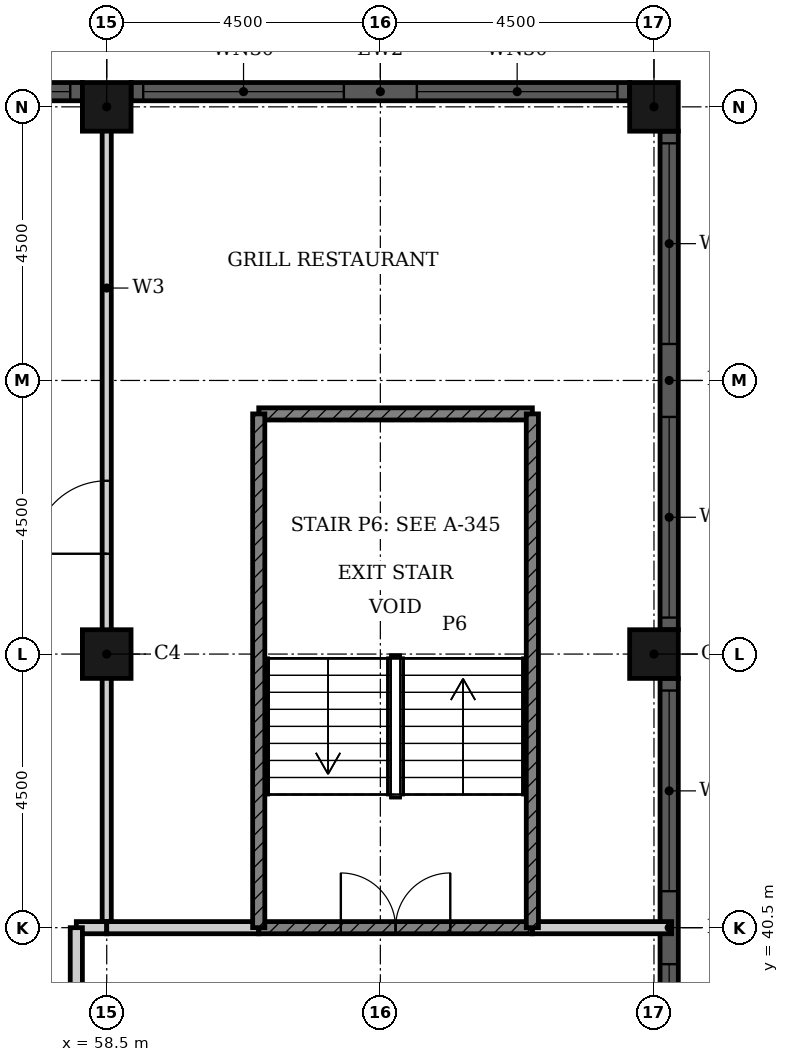
"""IFC4 building model, lengths in metres.
Left out: names, types, materials, properties, quantities, classifications, styles, units other than length and angle.
Written with IfcOpenShell. Run it as: python <this file> out.ifc"""

import sys

from ifc_helpers import new_model, si_unit, direction, frame, frame_2d, origin, origin_2d, place, context, subcontext, project, spatial, rectangle, hollow_rectangle, extrude, element, fill, save


model = new_model("IFC4")
c1 = context("Model", 3, precision=1e-05, world=origin(), true_north=direction((0.0, 1.0)))
c2 = subcontext(c1, "Body", "Model", "MODEL_VIEW")
j1 = project(units=[si_unit("LENGTHUNIT", "METRE"), si_unit("PLANEANGLEUNIT", "RADIAN")], contexts=[c1])
p1 = place(None, origin())
s1 = spatial("IfcSite", under=j1, at=p1, CompositionType="ELEMENT")
p2 = place(p1, origin())
s2 = spatial("IfcBuilding", under=s1, at=p2, CompositionType="ELEMENT")
p3 = place(p2, frame((0.0, 0.0, 12.0)))
s3 = spatial("IfcBuildingStorey", under=s2, at=p3, CompositionType="ELEMENT", Elevation=12.0)
for number, where, z_axis, x_axis in (
    (1, (58.5, 54.0, 0.0), (0.0, 0.0, 1.0), (1.0, 0.0, 0.0)),
    (2, (67.5, 45.0, 0.0), (0.0, 0.0, 1.0), (1.0, 0.0, 0.0)),
    (3, (67.5, 54.0, 0.0), (0.0, 0.0, 1.0), (1.0, 0.0, 0.0)),
    (4, (58.5, 45.0, 0.0), (0.0, 0.0, 1.0), (1.0, 0.0, 0.0)),
):
    element("IfcColumn", number, at=place(p3, frame(where, z_axis=z_axis, x_axis=x_axis)), inside=s3, PredefinedType="COLUMN", context=c2, shape_type="SweptSolid", body=[
        extrude(hollow_rectangle(XDim=0.8, YDim=0.8, WallThickness=0.025, at=origin_2d()), origin(), (0.0, 0.0, 1.0), 5.4),
    ])
p4 = place(p3, frame((67.75, 36.4, 0.0), z_axis=(0.0, 0.0, 1.0), x_axis=(0.0, 1.0, 0.0)))
e5 = element("IfcWall", 5, at=p4, inside=s3, PredefinedType="SOLIDWALL", context=c2, shape_type="SweptSolid", body=[
    extrude(rectangle(XDim=8.2, YDim=0.3, at=frame_2d((4.1, 0.0))), origin(), (0.0, 0.0, 1.0), 5.4),
])
p5 = place(p4, frame((0.2, 0.0, 0.9)))
e6 = element("IfcOpeningElement", 6, at=p5, cuts=e5, PredefinedType="OPENING", context=c2, shape_type="SweptSolid", body=[
    extrude(rectangle(XDim=3.3, YDim=3.5, at=frame_2d((1.65, 1.75))), frame((0.0, 0.16, 0.0), z_axis=(0.0, -1.0, 0.0), x_axis=(1.0, 0.0, 0.0)), (0.0, 0.0, 1.0), 0.32),
])
p6 = place(p4, frame((4.7, 0.0, 0.9)))
e7 = element("IfcOpeningElement", 7, at=p6, cuts=e5, PredefinedType="OPENING", context=c2, shape_type="SweptSolid", body=[
    extrude(rectangle(XDim=3.3, YDim=3.5, at=frame_2d((1.65, 1.75))), frame((0.0, 0.16, 0.0), z_axis=(0.0, -1.0, 0.0), x_axis=(1.0, 0.0, 0.0)), (0.0, 0.0, 1.0), 0.32),
])
p7 = place(p3, frame((67.75, 45.4, 0.0), z_axis=(0.0, 0.0, 1.0), x_axis=(0.0, 1.0, 0.0)))
e8 = element("IfcWall", 8, at=p7, inside=s3, PredefinedType="SOLIDWALL", context=c2, shape_type="SweptSolid", body=[
    extrude(rectangle(XDim=8.2, YDim=0.3, at=frame_2d((4.1, 0.0))), origin(), (0.0, 0.0, 1.0), 5.4),
])
p8 = place(p7, frame((0.2, 0.0, 0.9)))
e9 = element("IfcOpeningElement", 9, at=p8, cuts=e8, PredefinedType="OPENING", context=c2, shape_type="SweptSolid", body=[
    extrude(rectangle(XDim=3.3, YDim=3.5, at=frame_2d((1.65, 1.75))), frame((0.0, 0.16, 0.0), z_axis=(0.0, -1.0, 0.0), x_axis=(1.0, 0.0, 0.0)), (0.0, 0.0, 1.0), 0.32),
])
p9 = place(p7, frame((4.7, 0.0, 0.9)))
e10 = element("IfcOpeningElement", 10, at=p9, cuts=e8, PredefinedType="OPENING", context=c2, shape_type="SweptSolid", body=[
    extrude(rectangle(XDim=3.3, YDim=3.5, at=frame_2d((1.65, 1.75))), frame((0.0, 0.16, 0.0), z_axis=(0.0, -1.0, 0.0), x_axis=(1.0, 0.0, 0.0)), (0.0, 0.0, 1.0), 0.32),
])
p10 = place(p3, frame((67.1, 54.25, 0.0), z_axis=(0.0, 0.0, 1.0), x_axis=(-1.0, 0.0, 0.0)))
e11 = element("IfcWall", 11, at=p10, inside=s3, PredefinedType="SOLIDWALL", context=c2, shape_type="SweptSolid", body=[
    extrude(rectangle(XDim=8.2, YDim=0.3, at=frame_2d((4.1, 0.0))), origin(), (0.0, 0.0, 1.0), 5.4),
])
p11 = place(p10, frame((0.2, 0.0, 0.9)))
e12 = element("IfcOpeningElement", 12, at=p11, cuts=e11, PredefinedType="OPENING", context=c2, shape_type="SweptSolid", body=[
    extrude(rectangle(XDim=3.3, YDim=3.5, at=frame_2d((1.65, 1.75))), frame((0.0, 0.16, 0.0), z_axis=(0.0, -1.0, 0.0), x_axis=(1.0, 0.0, 0.0)), (0.0, 0.0, 1.0), 0.32),
])
p12 = place(p10, frame((4.7, 0.0, 0.9)))
e13 = element("IfcOpeningElement", 13, at=p12, cuts=e11, PredefinedType="OPENING", context=c2, shape_type="SweptSolid", body=[
    extrude(rectangle(XDim=3.3, YDim=3.5, at=frame_2d((1.65, 1.75))), frame((0.0, 0.16, 0.0), z_axis=(0.0, -1.0, 0.0), x_axis=(1.0, 0.0, 0.0)), (0.0, 0.0, 1.0), 0.32),
])
p13 = place(p3, frame((58.1, 54.25, 0.0), z_axis=(0.0, 0.0, 1.0), x_axis=(-1.0, 0.0, 0.0)))
e14 = element("IfcWall", 14, at=p13, inside=s3, PredefinedType="SOLIDWALL", context=c2, shape_type="SweptSolid", body=[
    extrude(rectangle(XDim=8.2, YDim=0.3, at=frame_2d((4.1, 0.0))), origin(), (0.0, 0.0, 1.0), 5.4),
])
p14 = place(p13, frame((0.2, 0.0, 0.9)))
e15 = element("IfcOpeningElement", 15, at=p14, cuts=e14, PredefinedType="OPENING", context=c2, shape_type="SweptSolid", body=[
    extrude(rectangle(XDim=3.3, YDim=3.5, at=frame_2d((1.65, 1.75))), frame((0.0, 0.16, 0.0), z_axis=(0.0, -1.0, 0.0), x_axis=(1.0, 0.0, 0.0)), (0.0, 0.0, 1.0), 0.32),
])
p15 = place(p13, frame((4.7, 0.0, 0.9)))
e16 = element("IfcOpeningElement", 16, at=p15, cuts=e14, PredefinedType="OPENING", context=c2, shape_type="SweptSolid", body=[
    extrude(rectangle(XDim=3.3, YDim=3.5, at=frame_2d((1.65, 1.75))), frame((0.0, 0.16, 0.0), z_axis=(0.0, -1.0, 0.0), x_axis=(1.0, 0.0, 0.0)), (0.0, 0.0, 1.0), 0.32),
])
p16 = place(p3, frame((58.5, 40.5, 0.0), z_axis=(0.0, 0.0, 1.0), x_axis=(0.0, 1.0, 0.0)))
e17 = element("IfcWall", 17, at=p16, inside=s3, PredefinedType="PARTITIONING", context=c2, shape_type="SweptSolid", body=[
    extrude(rectangle(XDim=13.69, YDim=0.15, at=frame_2d((6.845, 0.0))), origin(), (0.0, 0.0, 1.0), 5.05),
])
p17 = place(p16, frame((6.15, 0.0, 0.0)))
e18 = element("IfcOpeningElement", 18, at=p17, cuts=e17, PredefinedType="OPENING", context=c2, shape_type="SweptSolid", body=[
    extrude(rectangle(XDim=1.2, YDim=2.4, at=frame_2d((0.6, 1.2))), frame((0.0, 0.085, 0.0), z_axis=(0.0, -1.0, 0.0), x_axis=(1.0, 0.0, 0.0)), (0.0, 0.0, 1.0), 0.17),
])
p18 = place(p3, frame((58.0, 40.5, 0.0), z_axis=(0.0, 0.0, 1.0), x_axis=(1.0, 0.0, 0.0)))
e19 = element("IfcWall", 19, at=p18, inside=s3, PredefinedType="PARTITIONING", context=c2, shape_type="SweptSolid", body=[
    extrude(rectangle(XDim=0.5, YDim=0.2, at=frame_2d((0.25, 0.0))), origin(), (0.0, 0.0, 1.0), 5.05),
])
p19 = place(p3, frame((58.5, 40.5, 0.0), z_axis=(0.0, 0.0, 1.0), x_axis=(1.0, 0.0, 0.0)))
e20 = element("IfcWall", 20, at=p19, inside=s3, PredefinedType="PARTITIONING", context=c2, shape_type="SweptSolid", body=[
    extrude(rectangle(XDim=2.5, YDim=0.2, at=frame_2d((1.25, 0.0))), origin(), (0.0, 0.0, 1.0), 5.05),
])
p20 = place(p3, frame((65.5, 40.5, 0.0), z_axis=(0.0, 0.0, 1.0), x_axis=(1.0, 0.0, 0.0)))
e21 = element("IfcWall", 21, at=p20, inside=s3, PredefinedType="PARTITIONING", context=c2, shape_type="SweptSolid", body=[
    extrude(rectangle(XDim=2.29, YDim=0.2, at=frame_2d((1.145, 0.0))), origin(), (0.0, 0.0, 1.0), 5.05),
])
p21 = place(p3, frame((58.0, 37.5, 0.0), z_axis=(0.0, 0.0, 1.0), x_axis=(0.0, 1.0, 0.0)))
e22 = element("IfcWall", 22, at=p21, inside=s3, PredefinedType="PARTITIONING", context=c2, shape_type="SweptSolid", body=[
    extrude(rectangle(XDim=3.0, YDim=0.2, at=frame_2d((1.5, 0.0))), origin(), (0.0, 0.0, 1.0), 5.05),
])
p22 = place(p3, frame((61.0, 40.5, 0.0), z_axis=(0.0, 0.0, 1.0), x_axis=(1.0, 0.0, 0.0)))
e23 = element("IfcWall", 23, at=p22, inside=s3, PredefinedType="SHEAR", context=c2, shape_type="SweptSolid", body=[
    extrude(rectangle(XDim=4.5, YDim=0.2, at=frame_2d((2.25, 0.0))), origin(), (0.0, 0.0, 1.0), 5.05),
])
p23 = place(p22, frame((1.35, 0.0, 0.0)))
e24 = element("IfcOpeningElement", 24, at=p23, cuts=e23, PredefinedType="OPENING", context=c2, shape_type="SweptSolid", body=[
    extrude(rectangle(XDim=1.8, YDim=2.1, at=frame_2d((0.9, 1.05))), frame((0.0, 0.11, 0.0), z_axis=(0.0, -1.0, 0.0), x_axis=(1.0, 0.0, 0.0)), (0.0, 0.0, 1.0), 0.22),
])
p24 = place(p3, frame((61.0, 48.95, 0.0), z_axis=(0.0, 0.0, 1.0), x_axis=(1.0, 0.0, 0.0)))
e25 = element("IfcWall", 25, at=p24, inside=s3, PredefinedType="SHEAR", context=c2, shape_type="SweptSolid", body=[
    extrude(rectangle(XDim=4.5, YDim=0.2, at=frame_2d((2.25, 0.0))), origin(), (0.0, 0.0, 1.0), 5.05),
])
for number, where, z_axis, x_axis in (
    (26, (61.0, 40.5, 0.0), (0.0, 0.0, 1.0), (0.0, 1.0, 0.0)),
    (27, (65.5, 40.5, 0.0), (0.0, 0.0, 1.0), (0.0, 1.0, 0.0)),
):
    element("IfcWall", number, at=place(p3, frame(where, z_axis=z_axis, x_axis=x_axis)), inside=s3, PredefinedType="SHEAR", context=c2, shape_type="SweptSolid", body=[
        extrude(rectangle(XDim=8.45, YDim=0.2, at=frame_2d((4.225, 0.0))), origin(), (0.0, 0.0, 1.0), 5.05),
    ])
p25 = place(p5, origin())
e28 = element("IfcWindow", 28, at=p25, inside=s3, PartitioningType="SINGLE_PANEL", PredefinedType="WINDOW", context=c2, shape_type="SweptSolid", body=[
    extrude(rectangle(XDim=3.3, YDim=3.5, at=frame_2d((1.65, 1.75))), frame((0.0, 0.03, 0.0), z_axis=(0.0, -1.0, 0.0), x_axis=(1.0, 0.0, 0.0)), (0.0, 0.0, 1.0), 0.06),
])
fill(e6, e28)
p26 = place(p6, origin())
e29 = element("IfcWindow", 29, at=p26, inside=s3, PartitioningType="SINGLE_PANEL", PredefinedType="WINDOW", context=c2, shape_type="SweptSolid", body=[
    extrude(rectangle(XDim=3.3, YDim=3.5, at=frame_2d((1.65, 1.75))), frame((0.0, 0.03, 0.0), z_axis=(0.0, -1.0, 0.0), x_axis=(1.0, 0.0, 0.0)), (0.0, 0.0, 1.0), 0.06),
])
fill(e7, e29)
p27 = place(p8, origin())
e30 = element("IfcWindow", 30, at=p27, inside=s3, PartitioningType="SINGLE_PANEL", PredefinedType="WINDOW", context=c2, shape_type="SweptSolid", body=[
    extrude(rectangle(XDim=3.3, YDim=3.5, at=frame_2d((1.65, 1.75))), frame((0.0, 0.03, 0.0), z_axis=(0.0, -1.0, 0.0), x_axis=(1.0, 0.0, 0.0)), (0.0, 0.0, 1.0), 0.06),
])
fill(e9, e30)
p28 = place(p9, origin())
e31 = element("IfcWindow", 31, at=p28, inside=s3, PartitioningType="SINGLE_PANEL", PredefinedType="WINDOW", context=c2, shape_type="SweptSolid", body=[
    extrude(rectangle(XDim=3.3, YDim=3.5, at=frame_2d((1.65, 1.75))), frame((0.0, 0.03, 0.0), z_axis=(0.0, -1.0, 0.0), x_axis=(1.0, 0.0, 0.0)), (0.0, 0.0, 1.0), 0.06),
])
fill(e10, e31)
p29 = place(p11, origin())
e32 = element("IfcWindow", 32, at=p29, inside=s3, PartitioningType="SINGLE_PANEL", PredefinedType="WINDOW", context=c2, shape_type="SweptSolid", body=[
    extrude(rectangle(XDim=3.3, YDim=3.5, at=frame_2d((1.65, 1.75))), frame((0.0, 0.03, 0.0), z_axis=(0.0, -1.0, 0.0), x_axis=(1.0, 0.0, 0.0)), (0.0, 0.0, 1.0), 0.06),
])
fill(e12, e32)
p30 = place(p12, origin())
e33 = element("IfcWindow", 33, at=p30, inside=s3, PartitioningType="SINGLE_PANEL", PredefinedType="WINDOW", context=c2, shape_type="SweptSolid", body=[
    extrude(rectangle(XDim=3.3, YDim=3.5, at=frame_2d((1.65, 1.75))), frame((0.0, 0.03, 0.0), z_axis=(0.0, -1.0, 0.0), x_axis=(1.0, 0.0, 0.0)), (0.0, 0.0, 1.0), 0.06),
])
fill(e13, e33)
p31 = place(p14, origin())
e34 = element("IfcWindow", 34, at=p31, inside=s3, PartitioningType="SINGLE_PANEL", PredefinedType="WINDOW", context=c2, shape_type="SweptSolid", body=[
    extrude(rectangle(XDim=3.3, YDim=3.5, at=frame_2d((1.65, 1.75))), frame((0.0, 0.03, 0.0), z_axis=(0.0, -1.0, 0.0), x_axis=(1.0, 0.0, 0.0)), (0.0, 0.0, 1.0), 0.06),
])
fill(e15, e34)
p32 = place(p23, origin())
e35 = element("IfcDoor", 35, at=p32, inside=s3, OperationType="DOUBLE_DOOR_SINGLE_SWING", PredefinedType="DOOR", context=c2, shape_type="SweptSolid", body=[
    extrude(rectangle(XDim=1.8, YDim=2.1, at=frame_2d((0.9, 1.05))), frame((0.0, 0.025, 0.0), z_axis=(0.0, -1.0, 0.0), x_axis=(1.0, 0.0, 0.0)), (0.0, 0.0, 1.0), 0.05),
])
fill(e24, e35)
p33 = place(p17, origin())
e36 = element("IfcDoor", 36, at=p33, inside=s3, OperationType="SINGLE_SWING_RIGHT", PredefinedType="DOOR", context=c2, shape_type="SweptSolid", body=[
    extrude(rectangle(XDim=1.2, YDim=2.4, at=frame_2d((0.6, 1.2))), frame((0.0, 0.025, 0.0), z_axis=(0.0, -1.0, 0.0), x_axis=(1.0, 0.0, 0.0)), (0.0, 0.0, 1.0), 0.05),
])
fill(e18, e36)
save(model, sys.argv[1])
